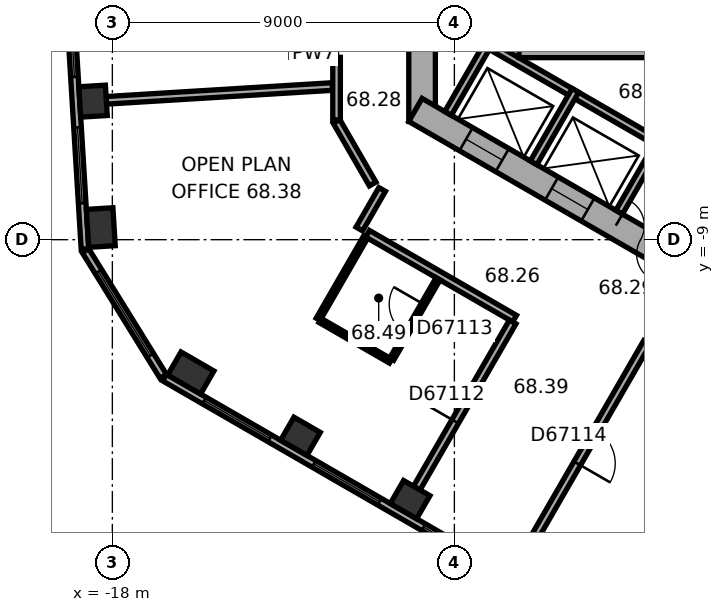
"""IFC4 building model, lengths in metres.
Left out: names, types, materials, properties, quantities, classifications, styles, units other than length and angle.
Written with IfcOpenShell. Run it as: python <this file> out.ifc"""

import sys

from ifc_helpers import new_model, si_unit, direction, frame, frame_2d, origin, origin_2d, place, context, subcontext, project, spatial, rectangle, extrude, element, fill, save


model = new_model("IFC4")
c1 = context("Model", 3, precision=1e-05, world=origin(), true_north=direction((0.0, 1.0)))
c2 = subcontext(c1, "Body", "Model", "MODEL_VIEW")
j1 = project(units=[si_unit("LENGTHUNIT", "METRE"), si_unit("PLANEANGLEUNIT", "RADIAN")], contexts=[c1])
p1 = place(None, origin())
s1 = spatial("IfcSite", under=j1, at=p1, CompositionType="ELEMENT")
p2 = place(p1, origin())
s2 = spatial("IfcBuilding", under=s1, at=p2, CompositionType="ELEMENT")
p3 = place(p2, frame((0.0, 0.0, 274.6)))
s3 = spatial("IfcBuildingStorey", under=s2, at=p3, CompositionType="ELEMENT", Elevation=274.6)
p4 = place(p3, frame((-18.508, -5.355, 0.0), z_axis=(0.0, 0.0, 1.0), x_axis=(0.061048539535, -0.998134798422, 0.0)))
e1 = element("IfcColumn", 1, at=p4, inside=s3, PredefinedType="COLUMN", context=c2, shape_type="SweptSolid", body=[
    extrude(rectangle(XDim=0.8, YDim=0.7, at=origin_2d()), origin(), (0.0, 0.0, 1.0), 3.7),
])
for number, where, z_axis, x_axis in (
    (2, (-18.304, -8.68, 0.0), (0.0, 0.0, 1.0), (0.061, -0.998, 0.0)),
    (3, (-15.936, -12.508, 0.0), (0.0, 0.0, 1.0), (0.866, -0.5, 0.0)),
):
    element("IfcColumn", number, at=place(p3, frame(where, z_axis=z_axis, x_axis=x_axis)), inside=s3, PredefinedType="COLUMN", context=c2, shape_type="SweptSolid", body=[
        extrude(rectangle(XDim=1.0, YDim=0.7, at=origin_2d()), origin(), (0.0, 0.0, 1.0), 3.7),
    ])
for number, where, z_axis, x_axis in (
    (4, (-13.05, -14.174, 0.0), (0.0, 0.0, 1.0), (0.866, -0.5, 0.0)),
    (5, (-10.165, -15.84, 0.0), (0.0, 0.0, 1.0), (0.866, -0.5, 0.0)),
):
    element("IfcColumn", number, at=place(p3, frame(where, z_axis=z_axis, x_axis=x_axis)), inside=s3, PredefinedType="COLUMN", context=c2, shape_type="SweptSolid", body=[
        extrude(rectangle(XDim=0.8, YDim=0.7, at=origin_2d()), origin(), (0.0, 0.0, 1.0), 3.7),
    ])
p5 = place(p3, frame((-9.85, 5.889, 0.0), z_axis=(0.0, 0.0, 1.0), x_axis=(0.0, -1.0, 0.0)))
e6 = element("IfcWall", 6, at=p5, inside=s3, PredefinedType="SHEAR", context=c2, shape_type="SweptSolid", body=[
    extrude(rectangle(XDim=11.778, YDim=0.7, at=frame_2d((5.889, 0.0))), origin(), (0.0, 0.0, 1.0), 3.7),
])
p6 = place(p5, frame((5.039, 0.0, 0.0)))
e7 = element("IfcOpeningElement", 7, at=p6, cuts=e6, PredefinedType="OPENING", context=c2, shape_type="SweptSolid", body=[
    extrude(rectangle(XDim=1.1, YDim=2.1, at=frame_2d((0.55, 1.05))), frame((0.0, 0.36, 0.0), z_axis=(0.0, -1.0, 0.0), x_axis=(1.0, 0.0, 0.0)), (0.0, 0.0, 1.0), 0.72),
])
p7 = place(p5, frame((7.639, 0.0, 0.0)))
e8 = element("IfcOpeningElement", 8, at=p7, cuts=e6, PredefinedType="OPENING", context=c2, shape_type="SweptSolid", body=[
    extrude(rectangle(XDim=1.1, YDim=2.1, at=frame_2d((0.55, 1.05))), frame((0.0, 0.36, 0.0), z_axis=(0.0, -1.0, 0.0), x_axis=(1.0, 0.0, 0.0)), (0.0, 0.0, 1.0), 0.72),
])
p8 = place(p3, frame((-10.025, -5.586, 0.0), z_axis=(0.0, 0.0, 1.0), x_axis=(0.866026453023, -0.499998182661, 0.0)))
e9 = element("IfcWall", 9, at=p8, inside=s3, PredefinedType="SHEAR", context=c2, shape_type="SweptSolid", body=[
    extrude(rectangle(XDim=11.778, YDim=0.7, at=frame_2d((5.889, 0.0))), origin(), (0.0, 0.0, 1.0), 3.7),
])
p9 = place(p8, frame((6.089, 0.0, 0.0)))
e10 = element("IfcOpeningElement", 10, at=p9, cuts=e9, PredefinedType="OPENING", context=c2, shape_type="SweptSolid", body=[
    extrude(rectangle(XDim=1.5, YDim=2.1, at=frame_2d((0.75, 1.05))), frame((0.0, 0.36, 0.0), z_axis=(0.0, -1.0, 0.0), x_axis=(1.0, 0.0, 0.0)), (0.0, 0.0, 1.0), 0.72),
])
p10 = place(p8, frame((1.539, 0.0, 0.0)))
e11 = element("IfcOpeningElement", 11, at=p10, cuts=e9, PredefinedType="OPENING", context=c2, shape_type="SweptSolid", body=[
    extrude(rectangle(XDim=1.1, YDim=2.1, at=frame_2d((0.55, 1.05))), frame((0.0, 0.36, 0.0), z_axis=(0.0, -1.0, 0.0), x_axis=(1.0, 0.0, 0.0)), (0.0, 0.0, 1.0), 0.72),
])
p11 = place(p8, frame((4.139, 0.0, 0.0)))
e12 = element("IfcOpeningElement", 12, at=p11, cuts=e9, PredefinedType="OPENING", context=c2, shape_type="SweptSolid", body=[
    extrude(rectangle(XDim=1.1, YDim=2.1, at=frame_2d((0.55, 1.05))), frame((0.0, 0.36, 0.0), z_axis=(0.0, -1.0, 0.0), x_axis=(1.0, 0.0, 0.0)), (0.0, 0.0, 1.0), 0.72),
])
p12 = place(p3, frame((-19.803, 8.454, 0.0), z_axis=(0.0, 0.0, 1.0), x_axis=(0.061036717565, -0.998135521414, 0.0)))
e13 = element("IfcWall", 13, at=p12, inside=s3, PredefinedType="STANDARD", context=c2, shape_type="SweptSolid", body=[
    extrude(rectangle(XDim=17.731, YDim=0.2, at=frame_2d((8.866, 0.0))), origin(), (0.0, 0.0, 1.0), 3.7),
])
p13 = place(p12, frame((1.202, 0.0, 0.9)))
e14 = element("IfcOpeningElement", 14, at=p13, cuts=e13, PredefinedType="OPENING", context=c2, shape_type="SweptSolid", body=[
    extrude(rectangle(XDim=2.0, YDim=2.0, at=frame_2d((1.0, 1.0))), frame((0.0, 0.11, 0.0), z_axis=(0.0, -1.0, 0.0), x_axis=(1.0, 0.0, 0.0)), (0.0, 0.0, 1.0), 0.22),
])
p14 = place(p12, frame((4.533, 0.0, 0.9)))
e15 = element("IfcOpeningElement", 15, at=p14, cuts=e13, PredefinedType="OPENING", context=c2, shape_type="SweptSolid", body=[
    extrude(rectangle(XDim=2.0, YDim=2.0, at=frame_2d((1.0, 1.0))), frame((0.0, 0.11, 0.0), z_axis=(0.0, -1.0, 0.0), x_axis=(1.0, 0.0, 0.0)), (0.0, 0.0, 1.0), 0.22),
])
p15 = place(p12, frame((7.865, 0.0, 0.9)))
e16 = element("IfcOpeningElement", 16, at=p15, cuts=e13, PredefinedType="OPENING", context=c2, shape_type="SweptSolid", body=[
    extrude(rectangle(XDim=2.0, YDim=2.0, at=frame_2d((1.0, 1.0))), frame((0.0, 0.11, 0.0), z_axis=(0.0, -1.0, 0.0), x_axis=(1.0, 0.0, 0.0)), (0.0, 0.0, 1.0), 0.22),
])
p16 = place(p12, frame((11.197, 0.0, 0.9)))
e17 = element("IfcOpeningElement", 17, at=p16, cuts=e13, PredefinedType="OPENING", context=c2, shape_type="SweptSolid", body=[
    extrude(rectangle(XDim=2.0, YDim=2.0, at=frame_2d((1.0, 1.0))), frame((0.0, 0.11, 0.0), z_axis=(0.0, -1.0, 0.0), x_axis=(1.0, 0.0, 0.0)), (0.0, 0.0, 1.0), 0.22),
])
p17 = place(p12, frame((14.528, 0.0, 0.9)))
e18 = element("IfcOpeningElement", 18, at=p17, cuts=e13, PredefinedType="OPENING", context=c2, shape_type="SweptSolid", body=[
    extrude(rectangle(XDim=2.0, YDim=2.0, at=frame_2d((1.0, 1.0))), frame((0.0, 0.11, 0.0), z_axis=(0.0, -1.0, 0.0), x_axis=(1.0, 0.0, 0.0)), (0.0, 0.0, 1.0), 0.22),
])
p18 = place(p3, frame((-18.706, -9.291, 0.0), z_axis=(0.0, 0.0, 1.0), x_axis=(0.526209683648, -0.850354848775, 0.0)))
e19 = element("IfcWall", 19, at=p18, inside=s3, PredefinedType="STANDARD", context=c2, shape_type="SweptSolid", body=[
    extrude(rectangle(XDim=3.886, YDim=0.2, at=frame_2d((1.943, 0.0))), origin(), (0.0, 0.0, 1.0), 3.7),
])
p19 = place(p18, frame((0.643, 0.0, 0.9)))
e20 = element("IfcOpeningElement", 20, at=p19, cuts=e19, PredefinedType="OPENING", context=c2, shape_type="SweptSolid", body=[
    extrude(rectangle(XDim=2.6, YDim=2.0, at=frame_2d((1.3, 1.0))), frame((0.0, 0.11, 0.0), z_axis=(0.0, -1.0, 0.0), x_axis=(1.0, 0.0, 0.0)), (0.0, 0.0, 1.0), 0.22),
])
p20 = place(p3, frame((-16.626, -12.629, 0.0), z_axis=(0.0, 0.0, 1.0), x_axis=(0.866026460444, -0.499998169808, 0.0)))
e21 = element("IfcWall", 21, at=p20, inside=s3, PredefinedType="STANDARD", context=c2, shape_type="SweptSolid", body=[
    extrude(rectangle(XDim=17.731, YDim=0.2, at=frame_2d((8.866, 0.0))), origin(), (0.0, 0.0, 1.0), 3.7),
])
p21 = place(p20, frame((1.203, 0.0, 0.9)))
e22 = element("IfcOpeningElement", 22, at=p21, cuts=e21, PredefinedType="OPENING", context=c2, shape_type="SweptSolid", body=[
    extrude(rectangle(XDim=2.0, YDim=2.0, at=frame_2d((1.0, 1.0))), frame((0.0, 0.11, 0.0), z_axis=(0.0, -1.0, 0.0), x_axis=(1.0, 0.0, 0.0)), (0.0, 0.0, 1.0), 0.22),
])
p22 = place(p20, frame((4.535, 0.0, 0.9)))
e23 = element("IfcOpeningElement", 23, at=p22, cuts=e21, PredefinedType="OPENING", context=c2, shape_type="SweptSolid", body=[
    extrude(rectangle(XDim=2.0, YDim=2.0, at=frame_2d((1.0, 1.0))), frame((0.0, 0.11, 0.0), z_axis=(0.0, -1.0, 0.0), x_axis=(1.0, 0.0, 0.0)), (0.0, 0.0, 1.0), 0.22),
])
p23 = place(p20, frame((7.867, 0.0, 0.9)))
e24 = element("IfcOpeningElement", 24, at=p23, cuts=e21, PredefinedType="OPENING", context=c2, shape_type="SweptSolid", body=[
    extrude(rectangle(XDim=2.0, YDim=2.0, at=frame_2d((1.0, 1.0))), frame((0.0, 0.11, 0.0), z_axis=(0.0, -1.0, 0.0), x_axis=(1.0, 0.0, 0.0)), (0.0, 0.0, 1.0), 0.22),
])
p24 = place(p20, frame((11.198, 0.0, 0.9)))
e25 = element("IfcOpeningElement", 25, at=p24, cuts=e21, PredefinedType="OPENING", context=c2, shape_type="SweptSolid", body=[
    extrude(rectangle(XDim=2.0, YDim=2.0, at=frame_2d((1.0, 1.0))), frame((0.0, 0.11, 0.0), z_axis=(0.0, -1.0, 0.0), x_axis=(1.0, 0.0, 0.0)), (0.0, 0.0, 1.0), 0.22),
])
p25 = place(p20, frame((14.53, 0.0, 0.9)))
e26 = element("IfcOpeningElement", 26, at=p25, cuts=e21, PredefinedType="OPENING", context=c2, shape_type="SweptSolid", body=[
    extrude(rectangle(XDim=2.0, YDim=2.0, at=frame_2d((1.0, 1.0))), frame((0.0, 0.11, 0.0), z_axis=(0.0, -1.0, 0.0), x_axis=(1.0, 0.0, 0.0)), (0.0, 0.0, 1.0), 0.22),
])
p26 = place(p3, frame((-8.203, -3.809, 0.0), z_axis=(0.0, 0.0, 1.0), x_axis=(0.866028230842, -0.499995103361, 0.0)))
e27 = element("IfcWall", 27, at=p26, inside=s3, PredefinedType="PARTITIONING", context=c2, shape_type="SweptSolid", body=[
    extrude(rectangle(XDim=5.4, YDim=0.2, at=frame_2d((2.7, 0.0))), origin(), (0.0, 0.0, 1.0), 3.35),
])
for number, where, z_axis, x_axis in (
    (28, (-8.067, -3.772, 0.0), (0.0, 0.0, 1.0), (-0.5, -0.866, 0.0)),
    (29, (-5.815, -5.072, 0.0), (0.0, 0.0, 1.0), (-0.5, -0.866, 0.0)),
):
    element("IfcWall", number, at=place(p3, frame(where, z_axis=z_axis, x_axis=x_axis)), inside=s3, PredefinedType="PARTITIONING", context=c2, shape_type="SweptSolid", body=[
        extrude(rectangle(XDim=2.2, YDim=0.2, at=frame_2d((1.1, 0.0))), origin(), (0.0, 0.0, 1.0), 3.35),
    ])
p27 = place(p3, frame((-3.563, -6.372, 0.0), z_axis=(0.0, 0.0, 1.0), x_axis=(-0.499994660107, -0.866028486751, 0.0)))
e30 = element("IfcWall", 30, at=p27, inside=s3, PredefinedType="PARTITIONING", context=c2, shape_type="SweptSolid", body=[
    extrude(rectangle(XDim=2.2, YDim=0.2, at=frame_2d((1.1, 0.0))), origin(), (0.0, 0.0, 1.0), 3.35),
])
p28 = place(p3, frame((-2.6, -4.06, 0.0), z_axis=(0.0, 0.0, 1.0), x_axis=(-1.0, 0.0, 0.0)))
e31 = element("IfcWall", 31, at=p28, inside=s3, PredefinedType="SHEAR", context=c2, shape_type="SweptSolid", body=[
    extrude(rectangle(XDim=4.7, YDim=0.3, at=frame_2d((2.35, 0.0))), origin(), (0.0, 0.0, 1.0), 3.35),
])
p29 = place(p3, frame((-18.158, -5.333, 0.0), z_axis=(0.0, 0.0, 1.0), x_axis=(0.998135365626, 0.061039265125, 0.0)))
e32 = element("IfcWall", 32, at=p29, inside=s3, PredefinedType="PARTITIONING", context=c2, shape_type="SweptSolid", body=[
    extrude(rectangle(XDim=5.96, YDim=0.2, at=frame_2d((2.98, 0.0))), origin(), (0.0, 0.0, 1.0), 2.65),
])
p30 = place(p3, frame((-13.301, -4.101, 0.0), z_axis=(0.0, 0.0, 1.0), x_axis=(1.0, 0.0, 0.0)))
e33 = element("IfcWall", 33, at=p30, inside=s3, PredefinedType="PARTITIONING", context=c2, shape_type="SweptSolid", body=[
    extrude(rectangle(XDim=1.201, YDim=0.2, at=frame_2d((0.601, 0.0))), origin(), (0.0, 0.0, 1.0), 3.35),
])
p31 = place(p3, frame((-12.585, -11.095, 0.0), z_axis=(0.0, 0.0, 1.0), x_axis=(0.500004234368, 0.866022959057, 0.0)))
e34 = element("IfcWall", 34, at=p31, inside=s3, PredefinedType="PARTITIONING", context=c2, shape_type="SweptSolid", body=[
    extrude(rectangle(XDim=2.5, YDim=0.12, at=frame_2d((1.25, 0.0))), origin(), (0.0, 0.0, 1.0), 3.35),
])
p32 = place(p3, frame((-12.1, -5.889, 0.0), z_axis=(0.0, 0.0, 1.0), x_axis=(0.500063520245, -0.865988727248, 0.0)))
e35 = element("IfcWall", 35, at=p32, inside=s3, PredefinedType="PARTITIONING", context=c2, shape_type="SweptSolid", body=[
    extrude(rectangle(XDim=1.9, YDim=0.2, at=frame_2d((0.95, 0.0))), origin(), (0.0, 0.0, 1.0), 3.35),
])
p33 = place(p3, frame((-12.1, -4.201, 0.0), z_axis=(0.0, 0.0, 1.0), x_axis=(0.0, -1.0, 0.0)))
e36 = element("IfcWall", 36, at=p33, inside=s3, PredefinedType="PARTITIONING", context=c2, shape_type="SweptSolid", body=[
    extrude(rectangle(XDim=1.648, YDim=0.2, at=frame_2d((0.824, 0.0))), origin(), (0.0, 0.0, 1.0), 3.35),
])
p34 = place(p3, frame((-11.285, -8.844, 0.0), z_axis=(0.0, 0.0, 1.0), x_axis=(0.866021785011, -0.500006267848, 0.0)))
e37 = element("IfcWall", 37, at=p34, inside=s3, PredefinedType="PARTITIONING", context=c2, shape_type="SweptSolid", body=[
    extrude(rectangle(XDim=4.468, YDim=0.2, at=frame_2d((2.234, 0.0))), origin(), (0.0, 0.0, 1.0), 3.35),
])
p35 = place(p3, frame((-10.901, -7.678, 0.0), z_axis=(0.0, 0.0, 1.0), x_axis=(-0.500074377092, -0.865982457891, 0.0)))
e38 = element("IfcWall", 38, at=p35, inside=s3, PredefinedType="PARTITIONING", context=c2, shape_type="SweptSolid", body=[
    extrude(rectangle(XDim=1.201, YDim=0.2, at=frame_2d((0.601, 0.0))), origin(), (0.0, 0.0, 1.0), 3.35),
])
p36 = place(p3, frame((-10.679, -12.195, 0.0), z_axis=(0.0, 0.0, 1.0), x_axis=(-0.866037418504, 0.499979189318, 0.0)))
e39 = element("IfcWall", 39, at=p36, inside=s3, PredefinedType="PARTITIONING", context=c2, shape_type="SweptSolid", body=[
    extrude(rectangle(XDim=2.14, YDim=0.12, at=frame_2d((1.07, 0.0))), origin(), (0.0, 0.0, 1.0), 3.35),
])
p37 = place(p3, frame((-9.99, -15.537, 0.0), z_axis=(0.0, 0.0, 1.0), x_axis=(0.499966611936, 0.866044679534, 0.0)))
e40 = element("IfcWall", 40, at=p37, inside=s3, PredefinedType="PARTITIONING", context=c2, shape_type="SweptSolid", body=[
    extrude(rectangle(XDim=5.049, YDim=0.2, at=frame_2d((2.524, 0.0))), origin(), (0.0, 0.0, 1.0), 2.65),
])
p38 = place(p37, frame((2.024, 0.0, 0.0)))
e41 = element("IfcOpeningElement", 41, at=p38, cuts=e40, PredefinedType="OPENING", context=c2, shape_type="SweptSolid", body=[
    extrude(rectangle(XDim=1.0, YDim=2.1, at=frame_2d((0.5, 1.05))), frame((0.0, 0.11, 0.0), z_axis=(0.0, -1.0, 0.0), x_axis=(1.0, 0.0, 0.0)), (0.0, 0.0, 1.0), 0.22),
])
p39 = place(p3, frame((-9.429, -10.03, 0.0), z_axis=(0.0, 0.0, 1.0), x_axis=(-0.500034220881, -0.866005645448, 0.0)))
e42 = element("IfcWall", 42, at=p39, inside=s3, PredefinedType="PARTITIONING", context=c2, shape_type="SweptSolid", body=[
    extrude(rectangle(XDim=2.44, YDim=0.12, at=frame_2d((1.22, 0.0))), origin(), (0.0, 0.0, 1.0), 3.35),
])
p40 = place(p39, frame((0.77, 0.0, 0.0)))
e43 = element("IfcOpeningElement", 43, at=p40, cuts=e42, PredefinedType="OPENING", context=c2, shape_type="SweptSolid", body=[
    extrude(rectangle(XDim=0.9, YDim=2.1, at=frame_2d((0.45, 1.05))), frame((0.0, 0.07, 0.0), z_axis=(0.0, -1.0, 0.0), x_axis=(1.0, 0.0, 0.0)), (0.0, 0.0, 1.0), 0.14),
])
p41 = place(p3, frame((-7.105, -17.202, 0.0), z_axis=(0.0, 0.0, 1.0), x_axis=(0.499988692146, 0.866031932279, 0.0)))
e44 = element("IfcWall", 44, at=p41, inside=s3, PredefinedType="PARTITIONING", context=c2, shape_type="SweptSolid", body=[
    extrude(rectangle(XDim=6.35, YDim=0.2, at=frame_2d((3.175, 0.0))), origin(), (0.0, 0.0, 1.0), 3.35),
])
p42 = place(p41, frame((2.675, 0.0, 0.0)))
e45 = element("IfcOpeningElement", 45, at=p42, cuts=e44, PredefinedType="OPENING", context=c2, shape_type="SweptSolid", body=[
    extrude(rectangle(XDim=1.0, YDim=2.1, at=frame_2d((0.5, 1.05))), frame((0.0, 0.11, 0.0), z_axis=(0.0, -1.0, 0.0), x_axis=(1.0, 0.0, 0.0)), (0.0, 0.0, 1.0), 0.22),
])
p43 = place(p16, origin())
e46 = element("IfcWindow", 46, at=p43, inside=s3, PartitioningType="SINGLE_PANEL", PredefinedType="WINDOW", context=c2, shape_type="SweptSolid", body=[
    extrude(rectangle(XDim=2.0, YDim=2.0, at=frame_2d((1.0, 1.0))), frame((0.0, 0.03, 0.0), z_axis=(0.0, -1.0, 0.0), x_axis=(1.0, 0.0, 0.0)), (0.0, 0.0, 1.0), 0.06),
])
fill(e17, e46)
p44 = place(p17, origin())
e47 = element("IfcWindow", 47, at=p44, inside=s3, PartitioningType="SINGLE_PANEL", PredefinedType="WINDOW", context=c2, shape_type="SweptSolid", body=[
    extrude(rectangle(XDim=2.0, YDim=2.0, at=frame_2d((1.0, 1.0))), frame((0.0, 0.03, 0.0), z_axis=(0.0, -1.0, 0.0), x_axis=(1.0, 0.0, 0.0)), (0.0, 0.0, 1.0), 0.06),
])
fill(e18, e47)
p45 = place(p19, origin())
e48 = element("IfcWindow", 48, at=p45, inside=s3, PartitioningType="SINGLE_PANEL", PredefinedType="WINDOW", context=c2, shape_type="SweptSolid", body=[
    extrude(rectangle(XDim=2.6, YDim=2.0, at=frame_2d((1.3, 1.0))), frame((0.0, 0.03, 0.0), z_axis=(0.0, -1.0, 0.0), x_axis=(1.0, 0.0, 0.0)), (0.0, 0.0, 1.0), 0.06),
])
fill(e20, e48)
p46 = place(p21, origin())
e49 = element("IfcWindow", 49, at=p46, inside=s3, PartitioningType="SINGLE_PANEL", PredefinedType="WINDOW", context=c2, shape_type="SweptSolid", body=[
    extrude(rectangle(XDim=2.0, YDim=2.0, at=frame_2d((1.0, 1.0))), frame((0.0, 0.03, 0.0), z_axis=(0.0, -1.0, 0.0), x_axis=(1.0, 0.0, 0.0)), (0.0, 0.0, 1.0), 0.06),
])
fill(e22, e49)
p47 = place(p22, origin())
e50 = element("IfcWindow", 50, at=p47, inside=s3, PartitioningType="SINGLE_PANEL", PredefinedType="WINDOW", context=c2, shape_type="SweptSolid", body=[
    extrude(rectangle(XDim=2.0, YDim=2.0, at=frame_2d((1.0, 1.0))), frame((0.0, 0.03, 0.0), z_axis=(0.0, -1.0, 0.0), x_axis=(1.0, 0.0, 0.0)), (0.0, 0.0, 1.0), 0.06),
])
fill(e23, e50)
p48 = place(p23, origin())
e51 = element("IfcWindow", 51, at=p48, inside=s3, PartitioningType="SINGLE_PANEL", PredefinedType="WINDOW", context=c2, shape_type="SweptSolid", body=[
    extrude(rectangle(XDim=2.0, YDim=2.0, at=frame_2d((1.0, 1.0))), frame((0.0, 0.03, 0.0), z_axis=(0.0, -1.0, 0.0), x_axis=(1.0, 0.0, 0.0)), (0.0, 0.0, 1.0), 0.06),
])
fill(e24, e51)
p49 = place(p9, origin())
e52 = element("IfcDoor", 52, at=p49, inside=s3, OperationType="DOUBLE_DOOR_SINGLE_SWING", PredefinedType="DOOR", context=c2, shape_type="SweptSolid", body=[
    extrude(rectangle(XDim=1.5, YDim=2.1, at=frame_2d((0.75, 1.05))), frame((0.0, 0.025, 0.0), z_axis=(0.0, -1.0, 0.0), x_axis=(1.0, 0.0, 0.0)), (0.0, 0.0, 1.0), 0.05),
])
fill(e10, e52)
p50 = place(p10, origin())
e53 = element("IfcDoor", 53, at=p50, inside=s3, OperationType="DOUBLE_DOOR_SLIDING", PredefinedType="DOOR", context=c2, shape_type="SweptSolid", body=[
    extrude(rectangle(XDim=1.1, YDim=2.1, at=frame_2d((0.55, 1.05))), frame((0.0, 0.025, 0.0), z_axis=(0.0, -1.0, 0.0), x_axis=(1.0, 0.0, 0.0)), (0.0, 0.0, 1.0), 0.05),
])
fill(e11, e53)
p51 = place(p11, origin())
e54 = element("IfcDoor", 54, at=p51, inside=s3, OperationType="DOUBLE_DOOR_SLIDING", PredefinedType="DOOR", context=c2, shape_type="SweptSolid", body=[
    extrude(rectangle(XDim=1.1, YDim=2.1, at=frame_2d((0.55, 1.05))), frame((0.0, 0.025, 0.0), z_axis=(0.0, -1.0, 0.0), x_axis=(1.0, 0.0, 0.0)), (0.0, 0.0, 1.0), 0.05),
])
fill(e12, e54)
p52 = place(p38, origin())
e55 = element("IfcDoor", 55, at=p52, inside=s3, OperationType="SINGLE_SWING_LEFT", PredefinedType="DOOR", context=c2, shape_type="SweptSolid", body=[
    extrude(rectangle(XDim=1.0, YDim=2.1, at=frame_2d((0.5, 1.05))), frame((0.0, 0.025, 0.0), z_axis=(0.0, -1.0, 0.0), x_axis=(1.0, 0.0, 0.0)), (0.0, 0.0, 1.0), 0.05),
])
fill(e41, e55)
p53 = place(p40, origin())
e56 = element("IfcDoor", 56, at=p53, inside=s3, OperationType="SINGLE_SWING_LEFT", PredefinedType="DOOR", context=c2, shape_type="SweptSolid", body=[
    extrude(rectangle(XDim=0.9, YDim=2.1, at=frame_2d((0.45, 1.05))), frame((0.0, 0.025, 0.0), z_axis=(0.0, -1.0, 0.0), x_axis=(1.0, 0.0, 0.0)), (0.0, 0.0, 1.0), 0.05),
])
fill(e43, e56)
p54 = place(p42, origin())
e57 = element("IfcDoor", 57, at=p54, inside=s3, OperationType="SINGLE_SWING_LEFT", PredefinedType="DOOR", context=c2, shape_type="SweptSolid", body=[
    extrude(rectangle(XDim=1.0, YDim=2.1, at=frame_2d((0.5, 1.05))), frame((0.0, 0.025, 0.0), z_axis=(0.0, -1.0, 0.0), x_axis=(1.0, 0.0, 0.0)), (0.0, 0.0, 1.0), 0.05),
])
fill(e45, e57)
save(model, sys.argv[1])
